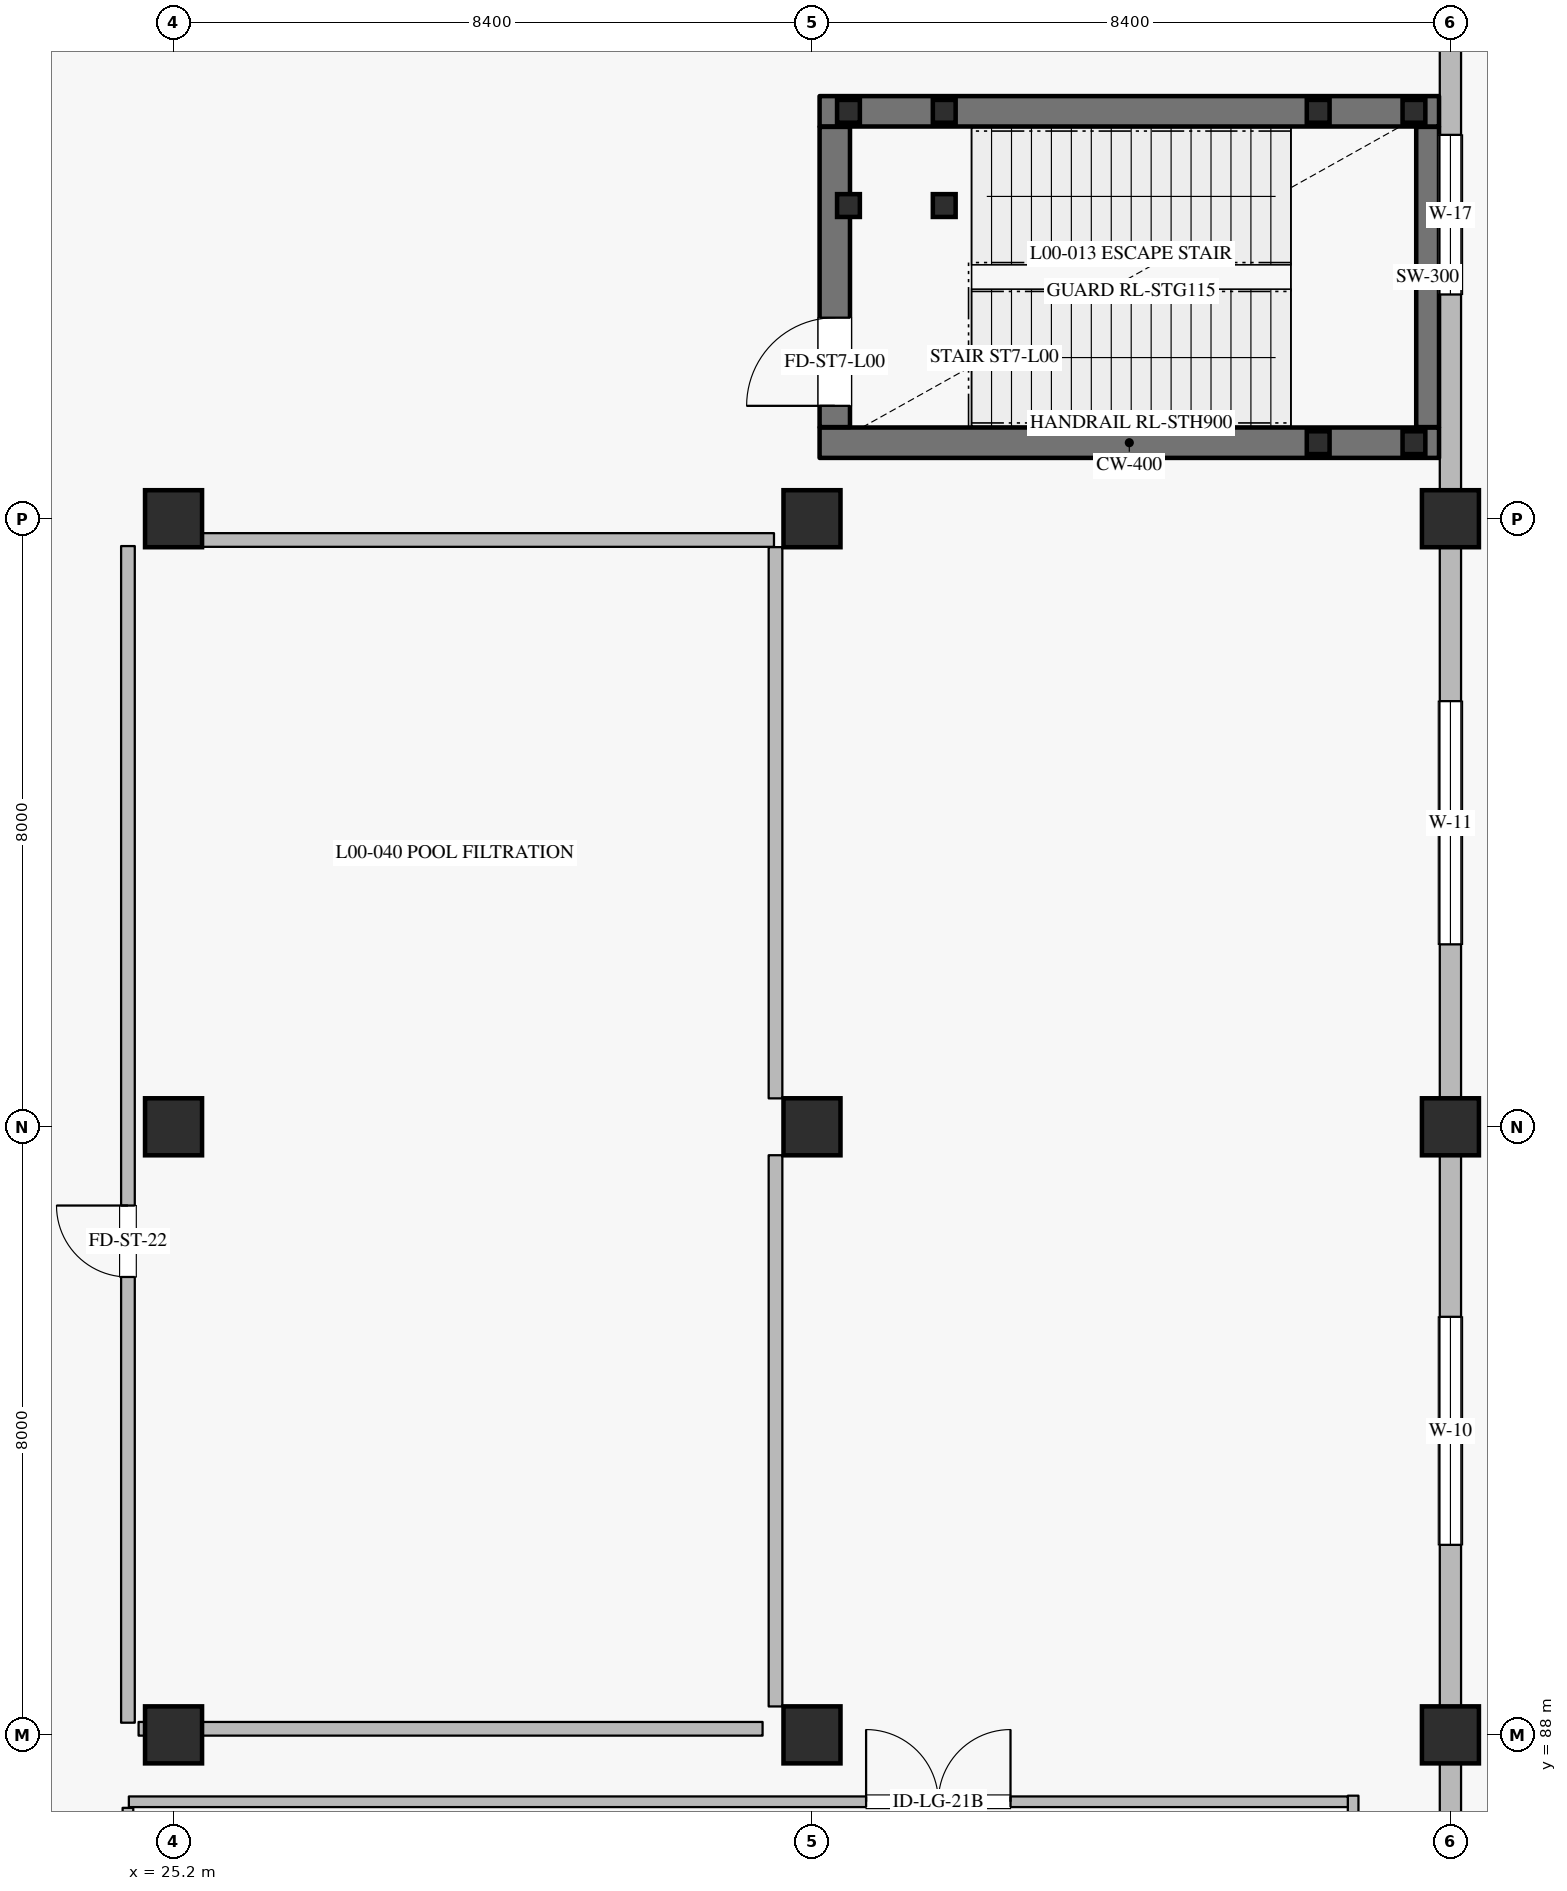
"""IFC4 building model, lengths in metres.
Left out: names, types, materials, properties, quantities, classifications, styles, units other than length and angle.
Written with IfcOpenShell. Run it as: python <this file> out.ifc"""

import sys

from ifc_helpers import new_model, si_unit, direction, frame, frame_2d, origin, origin_2d, place, context, subcontext, project, spatial, rectangle, hollow_rectangle, extrude, element, fill, save


model = new_model("IFC4")
c1 = context("Model", 3, precision=1e-05, world=origin(), true_north=direction((0.0, 1.0)))
c2 = subcontext(c1, "Body", "Model", "MODEL_VIEW")
j1 = project(units=[si_unit("LENGTHUNIT", "METRE"), si_unit("PLANEANGLEUNIT", "RADIAN")], contexts=[c1])
p1 = place(None, origin())
s1 = spatial("IfcSite", under=j1, at=p1, CompositionType="ELEMENT")
p2 = place(p1, origin())
s2 = spatial("IfcBuilding", under=s1, at=p2, CompositionType="ELEMENT")
p3 = place(p2, origin())
s3 = spatial("IfcBuildingStorey", under=s2, at=p3, CompositionType="ELEMENT", Elevation=0.0)
for number, where, z_axis, x_axis in (
    (1, (25.2, 88.0, 0.0), (0.0, 0.0, 1.0), (1.0, 0.0, 0.0)),
    (2, (25.2, 96.0, 0.0), (0.0, 0.0, 1.0), (1.0, 0.0, 0.0)),
    (3, (25.2, 104.0, 0.0), (0.0, 0.0, 1.0), (1.0, 0.0, 0.0)),
    (4, (33.6, 88.0, 0.0), (0.0, 0.0, 1.0), (1.0, 0.0, 0.0)),
    (5, (33.6, 96.0, 0.0), (0.0, 0.0, 1.0), (1.0, 0.0, 0.0)),
    (6, (33.6, 104.0, 0.0), (0.0, 0.0, 1.0), (1.0, 0.0, 0.0)),
    (7, (42.0, 88.0, 0.0), (0.0, 0.0, 1.0), (1.0, 0.0, 0.0)),
    (8, (42.0, 96.0, 0.0), (0.0, 0.0, 1.0), (1.0, 0.0, 0.0)),
    (9, (42.0, 104.0, 0.0), (0.0, 0.0, 1.0), (1.0, 0.0, 0.0)),
):
    element("IfcColumn", number, at=place(p3, frame(where, z_axis=z_axis, x_axis=x_axis)), inside=s3, PredefinedType="COLUMN", context=c2, shape_type="SweptSolid", body=[
        extrude(rectangle(XDim=0.75, YDim=0.75, at=origin_2d()), origin(), (0.0, 0.0, 1.0), 6.0),
    ])
p4 = place(p3, frame((42.0, 87.625, 0.0), z_axis=(0.0, 0.0, 1.0), x_axis=(0.0, -1.0, 0.0)))
e10 = element("IfcWall", 10, at=p4, inside=s3, PredefinedType="SOLIDWALL", context=c2, shape_type="SweptSolid", body=[
    extrude(rectangle(XDim=7.25, YDim=0.28, at=frame_2d((3.625, 0.0))), origin(), (0.0, 0.0, 1.0), 5.0),
])
p5 = place(p4, frame((2.225, 0.0, 0.0)))
e11 = element("IfcOpeningElement", 11, at=p5, cuts=e10, PredefinedType="OPENING", context=c2, shape_type="SweptSolid", body=[
    extrude(rectangle(XDim=2.8, YDim=2.8, at=frame_2d((1.4, 1.4))), frame((0.0, 0.15, 0.0), z_axis=(0.0, -1.0, 0.0), x_axis=(1.0, 0.0, 0.0)), (0.0, 0.0, 1.0), 0.3),
])
p6 = place(p3, frame((42.0, 95.625, 0.0), z_axis=(0.0, 0.0, 1.0), x_axis=(0.0, -1.0, 0.0)))
e12 = element("IfcWall", 12, at=p6, inside=s3, PredefinedType="SOLIDWALL", context=c2, shape_type="SweptSolid", body=[
    extrude(rectangle(XDim=7.25, YDim=0.28, at=frame_2d((3.625, 0.0))), origin(), (0.0, 0.0, 1.0), 5.0),
])
p7 = place(p6, frame((2.125, 0.0, 1.0)))
e13 = element("IfcOpeningElement", 13, at=p7, cuts=e12, PredefinedType="OPENING", context=c2, shape_type="SweptSolid", body=[
    extrude(rectangle(XDim=3.0, YDim=2.2, at=frame_2d((1.5, 1.1))), frame((0.0, 0.15, 0.0), z_axis=(0.0, -1.0, 0.0), x_axis=(1.0, 0.0, 0.0)), (0.0, 0.0, 1.0), 0.3),
])
p8 = place(p3, frame((42.0, 103.625, 0.0), z_axis=(0.0, 0.0, 1.0), x_axis=(0.0, -1.0, 0.0)))
e14 = element("IfcWall", 14, at=p8, inside=s3, PredefinedType="SOLIDWALL", context=c2, shape_type="SweptSolid", body=[
    extrude(rectangle(XDim=7.25, YDim=0.28, at=frame_2d((3.625, 0.0))), origin(), (0.0, 0.0, 1.0), 5.0),
])
p9 = place(p8, frame((2.025, 0.0, 1.0)))
e15 = element("IfcOpeningElement", 15, at=p9, cuts=e14, PredefinedType="OPENING", context=c2, shape_type="SweptSolid", body=[
    extrude(rectangle(XDim=3.2, YDim=2.4, at=frame_2d((1.6, 1.2))), frame((0.0, 0.15, 0.0), z_axis=(0.0, -1.0, 0.0), x_axis=(1.0, 0.0, 0.0)), (0.0, 0.0, 1.0), 0.3),
])
p10 = place(p3, frame((42.0, 111.625, 0.0), z_axis=(0.0, 0.0, 1.0), x_axis=(0.0, -1.0, 0.0)))
e16 = element("IfcWall", 16, at=p10, inside=s3, PredefinedType="SOLIDWALL", context=c2, shape_type="SweptSolid", body=[
    extrude(rectangle(XDim=7.25, YDim=0.28, at=frame_2d((3.625, 0.0))), origin(), (0.0, 0.0, 1.0), 5.0),
])
p11 = place(p10, frame((2.575, 0.0, 1.0)))
e17 = element("IfcOpeningElement", 17, at=p11, cuts=e16, PredefinedType="OPENING", context=c2, shape_type="SweptSolid", body=[
    extrude(rectangle(XDim=2.1, YDim=1.1, at=frame_2d((1.05, 0.55))), frame((0.0, 0.15, 0.0), z_axis=(0.0, -1.0, 0.0), x_axis=(1.0, 0.0, 0.0)), (0.0, 0.0, 1.0), 0.3),
])
p12 = place(p3, frame((33.7, 105.0, 0.0), z_axis=(0.0, 0.0, 1.0), x_axis=(1.0, 0.0, 0.0)))
e18 = element("IfcWall", 18, at=p12, inside=s3, PredefinedType="SHEAR", context=c2, shape_type="SweptSolid", body=[
    extrude(rectangle(XDim=8.15, YDim=0.4, at=frame_2d((4.075, 0.0))), origin(), (0.0, 0.0, 1.0), 5.675),
])
p13 = place(p3, frame((41.7, 105.205, 0.0), z_axis=(0.0, 0.0, 1.0), x_axis=(0.0, 1.0, 0.0)))
e19 = element("IfcWall", 19, at=p13, inside=s3, PredefinedType="SHEAR", context=c2, shape_type="SweptSolid", body=[
    extrude(rectangle(XDim=3.95, YDim=0.3, at=frame_2d((1.975, 0.0))), origin(), (0.0, 0.0, 1.0), 5.675),
])
p14 = place(p3, frame((33.7, 109.36, 0.0), z_axis=(0.0, 0.0, 1.0), x_axis=(1.0, 0.0, 0.0)))
e20 = element("IfcWall", 20, at=p14, inside=s3, PredefinedType="SHEAR", context=c2, shape_type="SweptSolid", body=[
    extrude(rectangle(XDim=8.15, YDim=0.4, at=frame_2d((4.075, 0.0))), origin(), (0.0, 0.0, 1.0), 5.675),
])
p15 = place(p3, frame((33.9, 105.205, 0.0), z_axis=(0.0, 0.0, 1.0), x_axis=(0.0, 1.0, 0.0)))
e21 = element("IfcWall", 21, at=p15, inside=s3, PredefinedType="SHEAR", context=c2, shape_type="SweptSolid", body=[
    extrude(rectangle(XDim=3.95, YDim=0.4, at=frame_2d((1.975, 0.0))), origin(), (0.0, 0.0, 1.0), 5.675),
])
p16 = place(p15, frame((0.28, 0.0, 0.0)))
e22 = element("IfcOpeningElement", 22, at=p16, cuts=e21, PredefinedType="OPENING", context=c2, shape_type="SweptSolid", body=[
    extrude(rectangle(XDim=1.16, YDim=2.2, at=frame_2d((0.58, 1.1))), frame((0.0, 0.21, 0.0), z_axis=(0.0, -1.0, 0.0), x_axis=(1.0, 0.0, 0.0)), (0.0, 0.0, 1.0), 0.42),
])
for number, where, z_axis, x_axis in (
    (23, (34.08, 108.12, 0.0), (0.0, 0.0, 1.0), (1.0, 0.0, 0.0)),
    (24, (34.08, 109.36, 0.0), (0.0, 0.0, 1.0), (1.0, 0.0, 0.0)),
    (25, (35.34, 108.12, 0.0), (0.0, 0.0, 1.0), (1.0, 0.0, 0.0)),
    (26, (35.34, 109.36, 0.0), (0.0, 0.0, 1.0), (1.0, 0.0, 0.0)),
):
    element("IfcColumn", number, at=place(p3, frame(where, z_axis=z_axis, x_axis=x_axis)), inside=s3, PredefinedType="COLUMN", context=c2, shape_type="SweptSolid", body=[
        extrude(hollow_rectangle(XDim=0.3, YDim=0.3, WallThickness=0.012, at=origin_2d()), origin(), (0.0, 0.0, 1.0), 5.82),
    ])
for number, where, z_axis, x_axis in (
    (27, (40.26, 105.0, -2.7), (0.0, 0.0, 1.0), (1.0, 0.0, 0.0)),
    (28, (40.26, 109.36, -2.7), (0.0, 0.0, 1.0), (1.0, 0.0, 0.0)),
    (29, (41.52, 105.0, -2.7), (0.0, 0.0, 1.0), (1.0, 0.0, 0.0)),
    (30, (41.52, 109.36, -2.7), (0.0, 0.0, 1.0), (1.0, 0.0, 0.0)),
):
    element("IfcColumn", number, at=place(p3, frame(where, z_axis=z_axis, x_axis=x_axis)), inside=s3, PredefinedType="COLUMN", context=c2, shape_type="SweptSolid", body=[
        extrude(hollow_rectangle(XDim=0.3, YDim=0.3, WallThickness=0.012, at=origin_2d()), origin(), (0.0, 0.0, 1.0), 5.52),
    ])
p17 = place(p3, frame((24.6, 65.36, 0.0), z_axis=(0.0, 0.0, 1.0), x_axis=(0.0, 1.0, 0.0)))
e31 = element("IfcWall", 31, at=p17, inside=s3, PredefinedType="PARTITIONING", context=c2, shape_type="SweptSolid", body=[
    extrude(rectangle(XDim=21.68, YDim=0.14, at=frame_2d((10.84, 0.0))), origin(), (0.0, 0.0, 1.0), 5.675),
])
p18 = place(p17, frame((9.89, 0.0, 0.0)))
e32 = element("IfcOpeningElement", 32, at=p18, cuts=e31, PredefinedType="OPENING", context=c2, shape_type="SweptSolid", body=[
    extrude(rectangle(XDim=1.9, YDim=2.4, at=frame_2d((0.95, 1.2))), frame((0.0, 0.08, 0.0), z_axis=(0.0, -1.0, 0.0), x_axis=(1.0, 0.0, 0.0)), (0.0, 0.0, 1.0), 0.16),
])
p19 = place(p3, frame((24.6, 88.16, 0.0), z_axis=(0.0, 0.0, 1.0), x_axis=(0.0, 1.0, 0.0)))
e33 = element("IfcWall", 33, at=p19, inside=s3, PredefinedType="PARTITIONING", context=c2, shape_type="SweptSolid", body=[
    extrude(rectangle(XDim=15.48, YDim=0.18, at=frame_2d((7.74, 0.0))), origin(), (0.0, 0.0, 1.0), 5.675),
])
p20 = place(p19, frame((5.864, 0.0, 0.0)))
e34 = element("IfcOpeningElement", 34, at=p20, cuts=e33, PredefinedType="OPENING", context=c2, shape_type="SweptSolid", body=[
    extrude(rectangle(XDim=0.94, YDim=2.15, at=frame_2d((0.47, 1.075))), frame((0.0, 0.1, 0.0), z_axis=(0.0, -1.0, 0.0), x_axis=(1.0, 0.0, 0.0)), (0.0, 0.0, 1.0), 0.2),
])
p21 = place(p3, frame((24.74, 88.08, 0.0), z_axis=(0.0, 0.0, 1.0), x_axis=(1.0, 0.0, 0.0)))
e35 = element("IfcWall", 35, at=p21, inside=s3, PredefinedType="PARTITIONING", context=c2, shape_type="SweptSolid", body=[
    extrude(rectangle(XDim=8.21, YDim=0.18, at=frame_2d((4.105, 0.0))), origin(), (0.0, 0.0, 1.0), 4.85),
])
p22 = place(p3, frame((40.72, 65.2, 0.0), z_axis=(0.0, 0.0, 1.0), x_axis=(0.0, 1.0, 0.0)))
e36 = element("IfcWall", 36, at=p22, inside=s3, PredefinedType="PARTITIONING", context=c2, shape_type="SweptSolid", body=[
    extrude(rectangle(XDim=22.0, YDim=0.14, at=frame_2d((11.0, 0.0))), origin(), (0.0, 0.0, 1.0), 5.675),
])
p23 = place(p3, frame((24.612, 87.12, 0.0), z_axis=(0.0, 0.0, 1.0), x_axis=(1.0, 0.0, 0.0)))
e37 = element("IfcWall", 37, at=p23, inside=s3, PredefinedType="PARTITIONING", context=c2, shape_type="SweptSolid", body=[
    extrude(rectangle(XDim=16.038, YDim=0.14, at=frame_2d((8.019, 0.0))), origin(), (0.0, 0.0, 1.0), 5.675),
])
p24 = place(p23, frame((9.7, 0.0, 0.0)))
e38 = element("IfcOpeningElement", 38, at=p24, cuts=e37, PredefinedType="OPENING", context=c2, shape_type="SweptSolid", body=[
    extrude(rectangle(XDim=1.9, YDim=2.4, at=frame_2d((0.95, 1.2))), frame((0.0, 0.08, 0.0), z_axis=(0.0, -1.0, 0.0), x_axis=(1.0, 0.0, 0.0)), (0.0, 0.0, 1.0), 0.16),
])
for number, where, z_axis, x_axis in (
    (39, (33.12, 88.374, 0.0), (0.0, 0.0, 1.0), (0.0, 1.0, 0.0)),
    (40, (33.12, 96.374, 0.0), (0.0, 0.0, 1.0), (0.0, 1.0, 0.0)),
):
    element("IfcWall", number, at=place(p3, frame(where, z_axis=z_axis, x_axis=x_axis)), inside=s3, PredefinedType="PARTITIONING", context=c2, shape_type="SweptSolid", body=[
        extrude(rectangle(XDim=7.252, YDim=0.18, at=frame_2d((3.626, 0.0))), origin(), (0.0, 0.0, 1.0), 5.675),
    ])
p25 = place(p3, frame((25.575, 103.72, 0.0), z_axis=(0.0, 0.0, 1.0), x_axis=(1.0, 0.0, 0.0)))
e41 = element("IfcWall", 41, at=p25, inside=s3, PredefinedType="PARTITIONING", context=c2, shape_type="SweptSolid", body=[
    extrude(rectangle(XDim=7.525, YDim=0.18, at=frame_2d((3.763, 0.0))), origin(), (0.0, 0.0, 1.0), 4.85),
])
p26 = place(p7, origin())
e42 = element("IfcWindow", 42, at=p26, inside=s3, PartitioningType="DOUBLE_PANEL_VERTICAL", PredefinedType="WINDOW", context=c2, shape_type="SweptSolid", body=[
    extrude(rectangle(XDim=3.0, YDim=2.2, at=frame_2d((1.5, 1.1))), frame((0.0, 0.03, 0.0), z_axis=(0.0, -1.0, 0.0), x_axis=(1.0, 0.0, 0.0)), (0.0, 0.0, 1.0), 0.06),
])
fill(e13, e42)
p27 = place(p9, origin())
e43 = element("IfcWindow", 43, at=p27, inside=s3, PartitioningType="DOUBLE_PANEL_VERTICAL", PredefinedType="WINDOW", context=c2, shape_type="SweptSolid", body=[
    extrude(rectangle(XDim=3.2, YDim=2.4, at=frame_2d((1.6, 1.2))), frame((0.0, 0.03, 0.0), z_axis=(0.0, -1.0, 0.0), x_axis=(1.0, 0.0, 0.0)), (0.0, 0.0, 1.0), 0.06),
])
fill(e15, e43)
p28 = place(p11, origin())
e44 = element("IfcWindow", 44, at=p28, inside=s3, PartitioningType="DOUBLE_PANEL_VERTICAL", PredefinedType="WINDOW", context=c2, shape_type="SweptSolid", body=[
    extrude(rectangle(XDim=2.1, YDim=1.1, at=frame_2d((1.05, 0.55))), frame((0.0, 0.03, 0.0), z_axis=(0.0, -1.0, 0.0), x_axis=(1.0, 0.0, 0.0)), (0.0, 0.0, 1.0), 0.06),
])
fill(e17, e44)
p29 = place(p16, origin())
e45 = element("IfcDoor", 45, at=p29, inside=s3, OperationType="SINGLE_SWING_LEFT", PredefinedType="DOOR", context=c2, shape_type="SweptSolid", body=[
    extrude(rectangle(XDim=1.16, YDim=2.2, at=frame_2d((0.58, 1.1))), frame((0.0, 0.025, 0.0), z_axis=(0.0, -1.0, 0.0), x_axis=(1.0, 0.0, 0.0)), (0.0, 0.0, 1.0), 0.05),
])
fill(e22, e45)
p30 = place(p20, origin())
e46 = element("IfcDoor", 46, at=p30, inside=s3, OperationType="SINGLE_SWING_RIGHT", PredefinedType="DOOR", context=c2, shape_type="SweptSolid", body=[
    extrude(rectangle(XDim=0.94, YDim=2.15, at=frame_2d((0.47, 1.075))), frame((0.0, 0.025, 0.0), z_axis=(0.0, -1.0, 0.0), x_axis=(1.0, 0.0, 0.0)), (0.0, 0.0, 1.0), 0.05),
])
fill(e34, e46)
p31 = place(p24, origin())
e47 = element("IfcDoor", 47, at=p31, inside=s3, OperationType="DOUBLE_DOOR_SINGLE_SWING", PredefinedType="DOOR", context=c2, shape_type="SweptSolid", body=[
    extrude(rectangle(XDim=1.9, YDim=2.4, at=frame_2d((0.95, 1.2))), frame((0.0, 0.025, 0.0), z_axis=(0.0, -1.0, 0.0), x_axis=(1.0, 0.0, 0.0)), (0.0, 0.0, 1.0), 0.05),
])
fill(e38, e47)
save(model, sys.argv[1])
